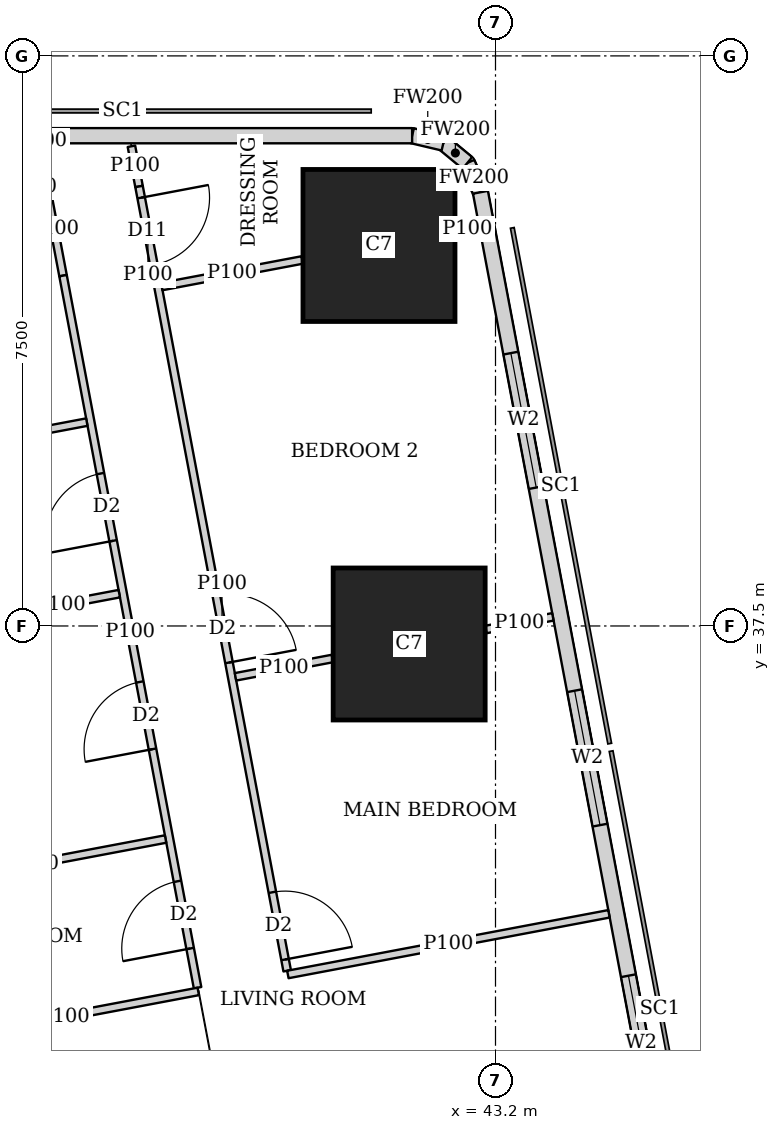
"""IFC4 building model, lengths in metres.
Left out: names, types, materials, properties, quantities, classifications, styles, units other than length and angle.
Written with IfcOpenShell. Run it as: python <this file> out.ifc"""

import sys

from ifc_helpers import new_model, si_unit, direction, frame, frame_2d, origin, origin_2d, place, context, subcontext, project, spatial, rectangle, extrude, element, fill, save


model = new_model("IFC4")
c1 = context("Model", 3, precision=1e-05, world=origin(), true_north=direction((0.0, 1.0)))
c2 = subcontext(c1, "Body", "Model", "MODEL_VIEW")
j1 = project(units=[si_unit("LENGTHUNIT", "METRE"), si_unit("PLANEANGLEUNIT", "RADIAN")], contexts=[c1])
p1 = place(None, origin())
s1 = spatial("IfcSite", under=j1, at=p1, CompositionType="ELEMENT")
p2 = place(p1, origin())
s2 = spatial("IfcBuilding", under=s1, at=p2, CompositionType="ELEMENT")
p3 = place(p2, frame((0.0, 0.0, 281.6)))
s3 = spatial("IfcBuildingStorey", under=s2, at=p3, CompositionType="ELEMENT", Elevation=281.6)
for number, where, z_axis, x_axis in (
    (1, (42.064, 37.263, 0.0), (0.0, 0.0, 1.0), (1.0, 0.0, 0.0)),
    (2, (41.667, 42.506, 0.0), (0.0, 0.0, 1.0), (1.0, 0.0, 0.0)),
):
    element("IfcColumn", number, at=place(p3, frame(where, z_axis=z_axis, x_axis=x_axis)), inside=s3, PredefinedType="COLUMN", context=c2, shape_type="SweptSolid", body=[
        extrude(rectangle(XDim=2.0, YDim=2.0, at=origin_2d()), origin(), (0.0, 0.0, 1.0), 3.75),
    ])
p4 = place(p3, frame((49.684, 7.832, 0.0), z_axis=(0.0, 0.0, 1.0), x_axis=(-0.185616669694, 0.982622232565, 0.0)))
e3 = element("IfcWall", 3, at=p4, inside=s3, PredefinedType="SOLIDWALL", context=c2, shape_type="SweptSolid", body=[
    extrude(rectangle(XDim=36.0, YDim=0.2, at=frame_2d((18.0, 0.0))), origin(), (0.0, 0.0, 1.0), 3.5),
])
p5 = place(p4, frame((2.518, 0.0, 0.9)))
e4 = element("IfcOpeningElement", 4, at=p5, cuts=e3, PredefinedType="OPENING", context=c2, shape_type="SweptSolid", body=[
    extrude(rectangle(XDim=2.4, YDim=1.5, at=frame_2d((1.2, 0.75))), frame((0.0, 0.11, 0.0), z_axis=(0.0, -1.0, 0.0), x_axis=(1.0, 0.0, 0.0)), (0.0, 0.0, 1.0), 0.22),
])
p6 = place(p4, frame((8.444, 0.0, 0.9)))
e5 = element("IfcOpeningElement", 5, at=p6, cuts=e3, PredefinedType="OPENING", context=c2, shape_type="SweptSolid", body=[
    extrude(rectangle(XDim=1.8, YDim=1.5, at=frame_2d((0.9, 0.75))), frame((0.0, 0.11, 0.0), z_axis=(0.0, -1.0, 0.0), x_axis=(1.0, 0.0, 0.0)), (0.0, 0.0, 1.0), 0.22),
])
p7 = place(p4, frame((12.261, 0.0, 0.9)))
e6 = element("IfcOpeningElement", 6, at=p7, cuts=e3, PredefinedType="OPENING", context=c2, shape_type="SweptSolid", body=[
    extrude(rectangle(XDim=1.8, YDim=1.5, at=frame_2d((0.9, 0.75))), frame((0.0, 0.11, 0.0), z_axis=(0.0, -1.0, 0.0), x_axis=(1.0, 0.0, 0.0)), (0.0, 0.0, 1.0), 0.22),
])
p8 = place(p4, frame((16.078, 0.0, 0.9)))
e7 = element("IfcOpeningElement", 7, at=p8, cuts=e3, PredefinedType="OPENING", context=c2, shape_type="SweptSolid", body=[
    extrude(rectangle(XDim=1.8, YDim=1.5, at=frame_2d((0.9, 0.75))), frame((0.0, 0.11, 0.0), z_axis=(0.0, -1.0, 0.0), x_axis=(1.0, 0.0, 0.0)), (0.0, 0.0, 1.0), 0.22),
])
p9 = place(p4, frame((19.894, 0.0, 0.9)))
e8 = element("IfcOpeningElement", 8, at=p9, cuts=e3, PredefinedType="OPENING", context=c2, shape_type="SweptSolid", body=[
    extrude(rectangle(XDim=1.8, YDim=1.5, at=frame_2d((0.9, 0.75))), frame((0.0, 0.11, 0.0), z_axis=(0.0, -1.0, 0.0), x_axis=(1.0, 0.0, 0.0)), (0.0, 0.0, 1.0), 0.22),
])
p10 = place(p4, frame((23.71, 0.0, 0.9)))
e9 = element("IfcOpeningElement", 9, at=p10, cuts=e3, PredefinedType="OPENING", context=c2, shape_type="SweptSolid", body=[
    extrude(rectangle(XDim=1.8, YDim=1.5, at=frame_2d((0.9, 0.75))), frame((0.0, 0.11, 0.0), z_axis=(0.0, -1.0, 0.0), x_axis=(1.0, 0.0, 0.0)), (0.0, 0.0, 1.0), 0.22),
])
p11 = place(p4, frame((27.526, 0.0, 0.9)))
e10 = element("IfcOpeningElement", 10, at=p11, cuts=e3, PredefinedType="OPENING", context=c2, shape_type="SweptSolid", body=[
    extrude(rectangle(XDim=1.8, YDim=1.5, at=frame_2d((0.9, 0.75))), frame((0.0, 0.11, 0.0), z_axis=(0.0, -1.0, 0.0), x_axis=(1.0, 0.0, 0.0)), (0.0, 0.0, 1.0), 0.22),
])
p12 = place(p4, frame((32.046, 0.0, 0.9)))
e11 = element("IfcOpeningElement", 11, at=p12, cuts=e3, PredefinedType="OPENING", context=c2, shape_type="SweptSolid", body=[
    extrude(rectangle(XDim=1.8, YDim=1.5, at=frame_2d((0.9, 0.75))), frame((0.0, 0.11, 0.0), z_axis=(0.0, -1.0, 0.0), x_axis=(1.0, 0.0, 0.0)), (0.0, 0.0, 1.0), 0.22),
])
p13 = place(p3, frame((43.002, 43.206, 0.0), z_axis=(0.0, 0.0, 1.0), x_axis=(-0.40678170573, 0.913525393124, 0.0)))
e12 = element("IfcWall", 12, at=p13, inside=s3, PredefinedType="SOLIDWALL", context=c2, shape_type="SweptSolid", body=[
    extrude(rectangle(XDim=0.423, YDim=0.2, at=frame_2d((0.211, 0.0))), origin(), (0.0, 0.0, 1.0), 3.5),
])
p14 = place(p3, frame((42.83, 43.592, 0.0), z_axis=(0.0, 0.0, 1.0), x_axis=(-0.771190539797, 0.636604391539, 0.0)))
e13 = element("IfcWall", 13, at=p14, inside=s3, PredefinedType="SOLIDWALL", context=c2, shape_type="SweptSolid", body=[
    extrude(rectangle(XDim=0.41, YDim=0.2, at=frame_2d((0.205, 0.0))), origin(), (0.0, 0.0, 1.0), 3.5),
])
p15 = place(p3, frame((42.514, 43.853, 0.0), z_axis=(0.0, 0.0, 1.0), x_axis=(-0.973288080424, 0.229587265555, 0.0)))
e14 = element("IfcWall", 14, at=p15, inside=s3, PredefinedType="SOLIDWALL", context=c2, shape_type="SweptSolid", body=[
    extrude(rectangle(XDim=0.422, YDim=0.2, at=frame_2d((0.211, 0.0))), origin(), (0.0, 0.0, 1.0), 3.5),
])
p16 = place(p3, frame((42.103, 43.95, 0.0), z_axis=(0.0, 0.0, 1.0), x_axis=(-1.0, 0.0, 0.0)))
e15 = element("IfcWall", 15, at=p16, inside=s3, PredefinedType="SOLIDWALL", context=c2, shape_type="SweptSolid", body=[
    extrude(rectangle(XDim=27.54, YDim=0.2, at=frame_2d((13.77, 0.0))), origin(), (0.0, 0.0, 1.0), 3.5),
])
p17 = place(p16, frame((10.603, 0.0, 0.9)))
e16 = element("IfcOpeningElement", 16, at=p17, cuts=e15, PredefinedType="OPENING", context=c2, shape_type="SweptSolid", body=[
    extrude(rectangle(XDim=1.8, YDim=1.5, at=frame_2d((0.9, 0.75))), frame((0.0, 0.11, 0.0), z_axis=(0.0, -1.0, 0.0), x_axis=(1.0, 0.0, 0.0)), (0.0, 0.0, 1.0), 0.22),
])
p18 = place(p16, frame((14.203, 0.0, 0.9)))
e17 = element("IfcOpeningElement", 17, at=p18, cuts=e15, PredefinedType="OPENING", context=c2, shape_type="SweptSolid", body=[
    extrude(rectangle(XDim=1.8, YDim=1.5, at=frame_2d((0.9, 0.75))), frame((0.0, 0.11, 0.0), z_axis=(0.0, -1.0, 0.0), x_axis=(1.0, 0.0, 0.0)), (0.0, 0.0, 1.0), 0.22),
])
p19 = place(p16, frame((17.803, 0.0, 0.9)))
e18 = element("IfcOpeningElement", 18, at=p19, cuts=e15, PredefinedType="OPENING", context=c2, shape_type="SweptSolid", body=[
    extrude(rectangle(XDim=1.8, YDim=1.5, at=frame_2d((0.9, 0.75))), frame((0.0, 0.11, 0.0), z_axis=(0.0, -1.0, 0.0), x_axis=(1.0, 0.0, 0.0)), (0.0, 0.0, 1.0), 0.22),
])
p20 = place(p16, frame((22.822, 0.0, 0.9)))
e19 = element("IfcOpeningElement", 19, at=p20, cuts=e15, PredefinedType="OPENING", context=c2, shape_type="SweptSolid", body=[
    extrude(rectangle(XDim=2.4, YDim=1.5, at=frame_2d((1.2, 0.75))), frame((0.0, 0.11, 0.0), z_axis=(0.0, -1.0, 0.0), x_axis=(1.0, 0.0, 0.0)), (0.0, 0.0, 1.0), 0.22),
])
p21 = place(p3, frame((33.781, 42.186, 0.0), z_axis=(0.0, 0.0, 1.0), x_axis=(0.185593518645, -0.9826266055, 0.0)))
e20 = element("IfcWall", 20, at=p21, inside=s3, PredefinedType="SOLIDWALL", context=c2, shape_type="SweptSolid", body=[
    extrude(rectangle(XDim=35.961, YDim=0.15, at=frame_2d((17.98, 0.0))), origin(), (0.0, 0.0, 1.0), 2.5),
])
p22 = place(p21, frame((11.76, 0.0, 0.0)))
e21 = element("IfcOpeningElement", 21, at=p22, cuts=e20, PredefinedType="OPENING", context=c2, shape_type="SweptSolid", body=[
    extrude(rectangle(XDim=1.0, YDim=2.1, at=frame_2d((0.5, 1.05))), frame((0.0, 0.085, 0.0), z_axis=(0.0, -1.0, 0.0), x_axis=(1.0, 0.0, 0.0)), (0.0, 0.0, 1.0), 0.17),
])
p23 = place(p21, frame((15.576, 0.0, 0.0)))
e22 = element("IfcOpeningElement", 22, at=p23, cuts=e20, PredefinedType="OPENING", context=c2, shape_type="SweptSolid", body=[
    extrude(rectangle(XDim=1.0, YDim=2.1, at=frame_2d((0.5, 1.05))), frame((0.0, 0.085, 0.0), z_axis=(0.0, -1.0, 0.0), x_axis=(1.0, 0.0, 0.0)), (0.0, 0.0, 1.0), 0.17),
])
p24 = place(p21, frame((30.502, 0.0, 0.0)))
e23 = element("IfcOpeningElement", 23, at=p24, cuts=e20, PredefinedType="OPENING", context=c2, shape_type="SweptSolid", body=[
    extrude(rectangle(XDim=1.0, YDim=2.1, at=frame_2d((0.5, 1.05))), frame((0.0, 0.085, 0.0), z_axis=(0.0, -1.0, 0.0), x_axis=(1.0, 0.0, 0.0)), (0.0, 0.0, 1.0), 0.17),
])
p25 = place(p3, frame((38.41, 43.811, 0.0), z_axis=(0.0, 0.0, 1.0), x_axis=(0.185903499302, -0.982568007289, 0.0)))
e24 = element("IfcWall", 24, at=p25, inside=s3, PredefinedType="PARTITIONING", context=c2, shape_type="SweptSolid", body=[
    extrude(rectangle(XDim=0.538, YDim=0.1, at=frame_2d((0.269, 0.0))), origin(), (0.0, 0.0, 1.0), 3.5),
])
p26 = place(p3, frame((38.51, 43.282, 0.0), z_axis=(0.0, 0.0, 1.0), x_axis=(0.185775287495, -0.982592256511, 0.0)))
e25 = element("IfcWall", 25, at=p26, inside=s3, PredefinedType="PARTITIONING", context=c2, shape_type="SweptSolid", body=[
    extrude(rectangle(XDim=1.259, YDim=0.1, at=frame_2d((0.629, 0.0))), origin(), (0.0, 0.0, 1.0), 2.05),
])
p27 = place(p26, frame((0.15, 0.0, 0.0)))
e26 = element("IfcOpeningElement", 26, at=p27, cuts=e25, PredefinedType="OPENING", context=c2, shape_type="SweptSolid", body=[
    extrude(rectangle(XDim=0.9, YDim=2.0, at=frame_2d((0.45, 1.0))), frame((0.0, 0.06, 0.0), z_axis=(0.0, -1.0, 0.0), x_axis=(1.0, 0.0, 0.0)), (0.0, 0.0, 1.0), 0.12),
])
p28 = place(p3, frame((38.744, 42.045, 0.0), z_axis=(0.0, 0.0, 1.0), x_axis=(0.185588352162, -0.982627581305, 0.0)))
e27 = element("IfcWall", 27, at=p28, inside=s3, PredefinedType="PARTITIONING", context=c2, shape_type="SweptSolid", body=[
    extrude(rectangle(XDim=9.241, YDim=0.1, at=frame_2d((4.621, 0.0))), origin(), (0.0, 0.0, 1.0), 3.5),
])
p29 = place(p28, frame((8.191, 0.0, 0.0)))
e28 = element("IfcOpeningElement", 28, at=p29, cuts=e27, PredefinedType="OPENING", context=c2, shape_type="SweptSolid", body=[
    extrude(rectangle(XDim=0.9, YDim=2.1, at=frame_2d((0.45, 1.05))), frame((0.0, 0.06, 0.0), z_axis=(0.0, -1.0, 0.0), x_axis=(1.0, 0.0, 0.0)), (0.0, 0.0, 1.0), 0.12),
])
p30 = place(p28, frame((4.215, 0.0, 0.0)))
e29 = element("IfcOpeningElement", 29, at=p30, cuts=e27, PredefinedType="OPENING", context=c2, shape_type="SweptSolid", body=[
    extrude(rectangle(XDim=0.9, YDim=2.1, at=frame_2d((0.45, 1.05))), frame((0.0, 0.06, 0.0), z_axis=(0.0, -1.0, 0.0), x_axis=(1.0, 0.0, 0.0)), (0.0, 0.0, 1.0), 0.12),
])
p31 = place(p3, frame((37.276, 43.346, 0.0), z_axis=(0.0, 0.0, 1.0), x_axis=(0.185962504646, -0.982556841544, 0.0)))
e30 = element("IfcWall", 30, at=p31, inside=s3, PredefinedType="PARTITIONING", context=c2, shape_type="SweptSolid", body=[
    extrude(rectangle(XDim=1.259, YDim=0.1, at=frame_2d((0.629, 0.0))), origin(), (0.0, 0.0, 1.0), 2.05),
])
p32 = place(p3, frame((37.51, 42.109, 0.0), z_axis=(0.0, 0.0, 1.0), x_axis=(0.185659798122, -0.982614084654, 0.0)))
e31 = element("IfcWall", 31, at=p32, inside=s3, PredefinedType="PARTITIONING", context=c2, shape_type="SweptSolid", body=[
    extrude(rectangle(XDim=9.534, YDim=0.1, at=frame_2d((4.767, 0.0))), origin(), (0.0, 0.0, 1.0), 3.5),
])
p33 = place(p32, frame((8.109, 0.0, 0.0)))
e32 = element("IfcOpeningElement", 32, at=p33, cuts=e31, PredefinedType="OPENING", context=c2, shape_type="SweptSolid", body=[
    extrude(rectangle(XDim=0.9, YDim=2.1, at=frame_2d((0.45, 1.05))), frame((0.0, 0.06, 0.0), z_axis=(0.0, -1.0, 0.0), x_axis=(1.0, 0.0, 0.0)), (0.0, 0.0, 1.0), 0.12),
])
p34 = place(p32, frame((2.65, 0.0, 0.0)))
e33 = element("IfcOpeningElement", 33, at=p34, cuts=e31, PredefinedType="OPENING", context=c2, shape_type="SweptSolid", body=[
    extrude(rectangle(XDim=0.9, YDim=2.1, at=frame_2d((0.45, 1.05))), frame((0.0, 0.06, 0.0), z_axis=(0.0, -1.0, 0.0), x_axis=(1.0, 0.0, 0.0)), (0.0, 0.0, 1.0), 0.12),
])
p35 = place(p32, frame((5.44, 0.0, 0.0)))
e34 = element("IfcOpeningElement", 34, at=p35, cuts=e31, PredefinedType="OPENING", context=c2, shape_type="SweptSolid", body=[
    extrude(rectangle(XDim=0.9, YDim=2.1, at=frame_2d((0.45, 1.05))), frame((0.0, 0.06, 0.0), z_axis=(0.0, -1.0, 0.0), x_axis=(1.0, 0.0, 0.0)), (0.0, 0.0, 1.0), 0.12),
])
p36 = place(p3, frame((42.985, 42.755, 0.0), z_axis=(0.0, 0.0, 1.0), x_axis=(-0.98281924824, -0.184570651215, 0.0)))
e35 = element("IfcWall", 35, at=p36, inside=s3, PredefinedType="PARTITIONING", context=c2, shape_type="SweptSolid", body=[
    extrude(rectangle(XDim=0.313, YDim=0.1, at=frame_2d((0.157, 0.0))), origin(), (0.0, 0.0, 1.0), 3.5),
])
p37 = place(p3, frame((40.657, 42.315, 0.0), z_axis=(0.0, 0.0, 1.0), x_axis=(-0.982640672055, -0.185519027661, 0.0)))
e36 = element("IfcWall", 36, at=p37, inside=s3, PredefinedType="PARTITIONING", context=c2, shape_type="SweptSolid", body=[
    extrude(rectangle(XDim=1.881, YDim=0.1, at=frame_2d((0.94, 0.0))), origin(), (0.0, 0.0, 1.0), 2.05),
])
p38 = place(p3, frame((43.955, 37.62, 0.0), z_axis=(0.0, 0.0, 1.0), x_axis=(-0.982708424405, -0.18515980288, 0.0)))
e37 = element("IfcWall", 37, at=p38, inside=s3, PredefinedType="PARTITIONING", context=c2, shape_type="SweptSolid", body=[
    extrude(rectangle(XDim=0.897, YDim=0.1, at=frame_2d((0.448, 0.0))), origin(), (0.0, 0.0, 1.0), 3.5),
])
p39 = place(p3, frame((41.054, 37.072, 0.0), z_axis=(0.0, 0.0, 1.0), x_axis=(-0.982602741717, -0.185719821156, 0.0)))
e38 = element("IfcWall", 38, at=p39, inside=s3, PredefinedType="PARTITIONING", context=c2, shape_type="SweptSolid", body=[
    extrude(rectangle(XDim=1.297, YDim=0.1, at=frame_2d((0.649, 0.0))), origin(), (0.0, 0.0, 1.0), 3.5),
])
p40 = place(p3, frame((44.693, 33.713, 0.0), z_axis=(0.0, 0.0, 1.0), x_axis=(-0.982633535512, -0.185556823879, 0.0)))
e39 = element("IfcWall", 39, at=p40, inside=s3, PredefinedType="PARTITIONING", context=c2, shape_type="SweptSolid", body=[
    extrude(rectangle(XDim=4.3, YDim=0.1, at=frame_2d((2.15, 0.0))), origin(), (0.0, 0.0, 1.0), 2.5),
])
p41 = place(p3, frame((37.823, 40.182, 0.0), z_axis=(0.0, 0.0, 1.0), x_axis=(-0.98263926043, -0.185526504472, 0.0)))
e40 = element("IfcWall", 40, at=p41, inside=s3, PredefinedType="PARTITIONING", context=c2, shape_type="SweptSolid", body=[
    extrude(rectangle(XDim=3.524, YDim=0.1, at=frame_2d((1.762, 0.0))), origin(), (0.0, 0.0, 1.0), 3.5),
])
p42 = place(p3, frame((38.25, 37.925, 0.0), z_axis=(0.0, 0.0, 1.0), x_axis=(-0.982610209589, -0.185680305934, 0.0)))
e41 = element("IfcWall", 41, at=p42, inside=s3, PredefinedType="PARTITIONING", context=c2, shape_type="SweptSolid", body=[
    extrude(rectangle(XDim=1.567, YDim=0.1, at=frame_2d((0.784, 0.0))), origin(), (0.0, 0.0, 1.0), 3.5),
])
p43 = place(p3, frame((39.289, 32.692, 0.0), z_axis=(0.0, 0.0, 1.0), x_axis=(-0.982662827464, -0.185401638399, 0.0)))
e42 = element("IfcWall", 42, at=p43, inside=s3, PredefinedType="PARTITIONING", context=c2, shape_type="SweptSolid", body=[
    extrude(rectangle(XDim=3.575, YDim=0.1, at=frame_2d((1.788, 0.0))), origin(), (0.0, 0.0, 1.0), 3.5),
])
p44 = place(p3, frame((38.859, 34.697, 0.0), z_axis=(0.0, 0.0, 1.0), x_axis=(-0.982626628545, -0.185593396635, 0.0)))
e43 = element("IfcWall", 43, at=p44, inside=s3, PredefinedType="PARTITIONING", context=c2, shape_type="SweptSolid", body=[
    extrude(rectangle(XDim=3.524, YDim=0.1, at=frame_2d((1.762, 0.0))), origin(), (0.0, 0.0, 1.0), 3.5),
])
p45 = place(p3, frame((37.947, 10.163, 0.0), z_axis=(0.0, 0.0, 1.0), x_axis=(-0.185572770922, 0.982630523998, 0.0)))
e44 = element("IfcWall", 44, at=p45, inside=s3, PredefinedType="PARTITIONING", context=c2, shape_type="SweptSolid", body=[
    extrude(rectangle(XDim=25.111, YDim=0.125, at=frame_2d((12.556, 0.0))), origin(), (0.0, 0.0, 1.0), 2.5),
])
p46 = place(p45, frame((0.708, 0.0, 0.0)))
e45 = element("IfcOpeningElement", 45, at=p46, cuts=e44, PredefinedType="OPENING", context=c2, shape_type="SweptSolid", body=[
    extrude(rectangle(XDim=1.0, YDim=2.1, at=frame_2d((0.5, 1.05))), frame((0.0, 0.073, 0.0), z_axis=(0.0, -1.0, 0.0), x_axis=(1.0, 0.0, 0.0)), (0.0, 0.0, 1.0), 0.145),
])
p47 = place(p45, frame((5.9, 0.0, 0.0)))
e46 = element("IfcOpeningElement", 46, at=p47, cuts=e44, PredefinedType="OPENING", context=c2, shape_type="SweptSolid", body=[
    extrude(rectangle(XDim=1.0, YDim=2.1, at=frame_2d((0.5, 1.05))), frame((0.0, 0.073, 0.0), z_axis=(0.0, -1.0, 0.0), x_axis=(1.0, 0.0, 0.0)), (0.0, 0.0, 1.0), 0.145),
])
p48 = place(p45, frame((13.378, 0.0, 0.0)))
e47 = element("IfcOpeningElement", 47, at=p48, cuts=e44, PredefinedType="OPENING", context=c2, shape_type="SweptSolid", body=[
    extrude(rectangle(XDim=1.0, YDim=2.1, at=frame_2d((0.5, 1.05))), frame((0.0, 0.073, 0.0), z_axis=(0.0, -1.0, 0.0), x_axis=(1.0, 0.0, 0.0)), (0.0, 0.0, 1.0), 0.145),
])
p49 = place(p45, frame((21.15, 0.0, 0.0)))
e48 = element("IfcOpeningElement", 48, at=p49, cuts=e44, PredefinedType="OPENING", context=c2, shape_type="SweptSolid", body=[
    extrude(rectangle(XDim=1.0, YDim=2.1, at=frame_2d((0.5, 1.05))), frame((0.0, 0.073, 0.0), z_axis=(0.0, -1.0, 0.0), x_axis=(1.0, 0.0, 0.0)), (0.0, 0.0, 1.0), 0.145),
])
p50 = place(p10, origin())
e49 = element("IfcWindow", 49, at=p50, inside=s3, PartitioningType="SINGLE_PANEL", PredefinedType="WINDOW", context=c2, shape_type="SweptSolid", body=[
    extrude(rectangle(XDim=1.8, YDim=1.5, at=frame_2d((0.9, 0.75))), frame((0.0, 0.03, 0.0), z_axis=(0.0, -1.0, 0.0), x_axis=(1.0, 0.0, 0.0)), (0.0, 0.0, 1.0), 0.06),
])
fill(e9, e49)
p51 = place(p11, origin())
e50 = element("IfcWindow", 50, at=p51, inside=s3, PartitioningType="SINGLE_PANEL", PredefinedType="WINDOW", context=c2, shape_type="SweptSolid", body=[
    extrude(rectangle(XDim=1.8, YDim=1.5, at=frame_2d((0.9, 0.75))), frame((0.0, 0.03, 0.0), z_axis=(0.0, -1.0, 0.0), x_axis=(1.0, 0.0, 0.0)), (0.0, 0.0, 1.0), 0.06),
])
fill(e10, e50)
p52 = place(p12, origin())
e51 = element("IfcWindow", 51, at=p52, inside=s3, PartitioningType="SINGLE_PANEL", PredefinedType="WINDOW", context=c2, shape_type="SweptSolid", body=[
    extrude(rectangle(XDim=1.8, YDim=1.5, at=frame_2d((0.9, 0.75))), frame((0.0, 0.03, 0.0), z_axis=(0.0, -1.0, 0.0), x_axis=(1.0, 0.0, 0.0)), (0.0, 0.0, 1.0), 0.06),
])
fill(e11, e51)
p53 = place(p27, origin())
e52 = element("IfcDoor", 52, at=p53, inside=s3, OperationType="SINGLE_SWING_LEFT", PredefinedType="DOOR", context=c2, shape_type="SweptSolid", body=[
    extrude(rectangle(XDim=0.9, YDim=2.0, at=frame_2d((0.45, 1.0))), frame((0.0, 0.025, 0.0), z_axis=(0.0, -1.0, 0.0), x_axis=(1.0, 0.0, 0.0)), (0.0, 0.0, 1.0), 0.05),
])
fill(e26, e52)
p54 = place(p29, origin())
e53 = element("IfcDoor", 53, at=p54, inside=s3, OperationType="SINGLE_SWING_RIGHT", PredefinedType="DOOR", context=c2, shape_type="SweptSolid", body=[
    extrude(rectangle(XDim=0.9, YDim=2.1, at=frame_2d((0.45, 1.05))), frame((0.0, 0.025, 0.0), z_axis=(0.0, -1.0, 0.0), x_axis=(1.0, 0.0, 0.0)), (0.0, 0.0, 1.0), 0.05),
])
fill(e28, e53)
p55 = place(p30, origin())
e54 = element("IfcDoor", 54, at=p55, inside=s3, OperationType="SINGLE_SWING_RIGHT", PredefinedType="DOOR", context=c2, shape_type="SweptSolid", body=[
    extrude(rectangle(XDim=0.9, YDim=2.1, at=frame_2d((0.45, 1.05))), frame((0.0, 0.025, 0.0), z_axis=(0.0, -1.0, 0.0), x_axis=(1.0, 0.0, 0.0)), (0.0, 0.0, 1.0), 0.05),
])
fill(e29, e54)
p56 = place(p33, origin())
e55 = element("IfcDoor", 55, at=p56, inside=s3, OperationType="SINGLE_SWING_LEFT", PredefinedType="DOOR", context=c2, shape_type="SweptSolid", body=[
    extrude(rectangle(XDim=0.9, YDim=2.1, at=frame_2d((0.45, 1.05))), frame((0.0, 0.025, 0.0), z_axis=(0.0, -1.0, 0.0), x_axis=(1.0, 0.0, 0.0)), (0.0, 0.0, 1.0), 0.05),
])
fill(e32, e55)
p57 = place(p34, origin())
e56 = element("IfcDoor", 56, at=p57, inside=s3, OperationType="SINGLE_SWING_LEFT", PredefinedType="DOOR", context=c2, shape_type="SweptSolid", body=[
    extrude(rectangle(XDim=0.9, YDim=2.1, at=frame_2d((0.45, 1.05))), frame((0.0, 0.025, 0.0), z_axis=(0.0, -1.0, 0.0), x_axis=(1.0, 0.0, 0.0)), (0.0, 0.0, 1.0), 0.05),
])
fill(e33, e56)
p58 = place(p35, origin())
e57 = element("IfcDoor", 57, at=p58, inside=s3, OperationType="SINGLE_SWING_LEFT", PredefinedType="DOOR", context=c2, shape_type="SweptSolid", body=[
    extrude(rectangle(XDim=0.9, YDim=2.1, at=frame_2d((0.45, 1.05))), frame((0.0, 0.025, 0.0), z_axis=(0.0, -1.0, 0.0), x_axis=(1.0, 0.0, 0.0)), (0.0, 0.0, 1.0), 0.05),
])
fill(e34, e57)
save(model, sys.argv[1])
